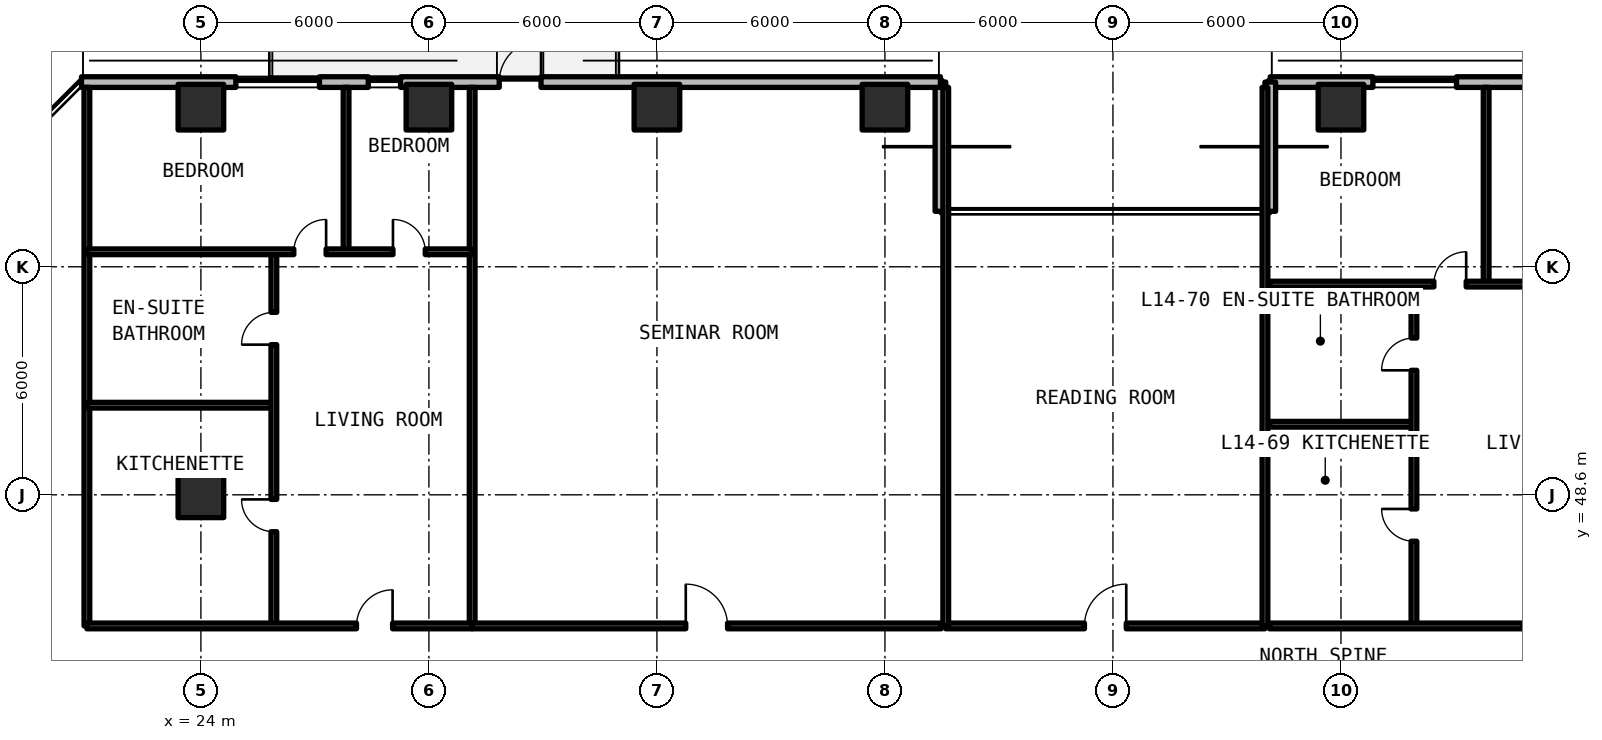
"""IFC4 building model, lengths in metres.
Left out: names, types, materials, properties, quantities, classifications, styles, units other than length and angle.
Written with IfcOpenShell. Run it as: python <this file> out.ifc"""

import sys

from ifc_helpers import new_model, si_unit, direction, frame, frame_2d, origin, origin_2d, place, context, subcontext, project, spatial, rectangle, extrude, element, fill, save


model = new_model("IFC4")
c1 = context("Model", 3, precision=1e-05, world=origin(), true_north=direction((0.0, 1.0)))
c2 = subcontext(c1, "Body", "Model", "MODEL_VIEW")
j1 = project(units=[si_unit("LENGTHUNIT", "METRE"), si_unit("PLANEANGLEUNIT", "RADIAN")], contexts=[c1])
p1 = place(None, origin())
s1 = spatial("IfcSite", under=j1, at=p1, CompositionType="ELEMENT")
p2 = place(p1, origin())
s2 = spatial("IfcBuilding", under=s1, at=p2, CompositionType="ELEMENT")
p3 = place(p2, frame((0.0, 0.0, 52.14)))
s3 = spatial("IfcBuildingStorey", under=s2, at=p3, CompositionType="ELEMENT", Elevation=52.14)
for number, where, z_axis, x_axis in (
    (1, (24.0, 48.6, 0.0), (0.0, 0.0, 1.0), (1.0, 0.0, 0.0)),
    (2, (24.0, 58.8, 0.0), (0.0, 0.0, 1.0), (1.0, 0.0, 0.0)),
    (3, (30.0, 58.8, 0.0), (0.0, 0.0, 1.0), (1.0, 0.0, 0.0)),
    (4, (36.0, 58.8, 0.0), (0.0, 0.0, 1.0), (1.0, 0.0, 0.0)),
    (5, (42.0, 58.8, 0.0), (0.0, 0.0, 1.0), (1.0, 0.0, 0.0)),
    (6, (54.0, 58.8, 0.0), (0.0, 0.0, 1.0), (1.0, 0.0, 0.0)),
):
    element("IfcColumn", number, at=place(p3, frame(where, z_axis=z_axis, x_axis=x_axis)), inside=s3, PredefinedType="COLUMN", context=c2, shape_type="SweptSolid", body=[
        extrude(rectangle(XDim=1.2, YDim=1.2, at=origin_2d()), origin(), (0.0, 0.0, 1.0), 3.3),
    ])
p4 = place(p3, frame((96.542, 59.46, 0.0), z_axis=(0.0, 0.0, 1.0), x_axis=(-1.0, 0.0, 0.0)))
e7 = element("IfcWall", 7, at=p4, inside=s3, PredefinedType="SOLIDWALL", context=c2, shape_type="SweptSolid", body=[
    extrude(rectangle(XDim=44.402, YDim=0.28, at=frame_2d((22.201, 0.0))), origin(), (0.0, 0.0, 1.0), 3.08),
])
p5 = place(p4, frame((32.292, 0.0, 0.0)))
e8 = element("IfcOpeningElement", 8, at=p5, cuts=e7, PredefinedType="OPENING", context=c2, shape_type="SweptSolid", body=[
    extrude(rectangle(XDim=1.1, YDim=2.15, at=frame_2d((0.55, 1.075))), frame((0.0, 0.15, 0.0), z_axis=(0.0, -1.0, 0.0), x_axis=(1.0, 0.0, 0.0)), (0.0, 0.0, 1.0), 0.3),
])
p6 = place(p4, frame((20.692, 0.0, 0.0)))
e9 = element("IfcOpeningElement", 9, at=p6, cuts=e7, PredefinedType="OPENING", context=c2, shape_type="SweptSolid", body=[
    extrude(rectangle(XDim=1.1, YDim=2.15, at=frame_2d((0.55, 1.075))), frame((0.0, 0.15, 0.0), z_axis=(0.0, -1.0, 0.0), x_axis=(1.0, 0.0, 0.0)), (0.0, 0.0, 1.0), 0.3),
])
p7 = place(p4, frame((8.342, 0.0, 0.0)))
e10 = element("IfcOpeningElement", 10, at=p7, cuts=e7, PredefinedType="OPENING", context=c2, shape_type="SweptSolid", body=[
    extrude(rectangle(XDim=1.1, YDim=2.15, at=frame_2d((0.55, 1.075))), frame((0.0, 0.15, 0.0), z_axis=(0.0, -1.0, 0.0), x_axis=(1.0, 0.0, 0.0)), (0.0, 0.0, 1.0), 0.3),
])
p8 = place(p4, frame((39.502, 0.0, 0.78)))
e11 = element("IfcOpeningElement", 11, at=p8, cuts=e7, PredefinedType="OPENING", context=c2, shape_type="SweptSolid", body=[
    extrude(rectangle(XDim=2.2, YDim=1.66, at=frame_2d((1.1, 0.83))), frame((0.0, 0.15, 0.0), z_axis=(0.0, -1.0, 0.0), x_axis=(1.0, 0.0, 0.0)), (0.0, 0.0, 1.0), 0.3),
])
p9 = place(p4, frame((34.821, 0.0, 0.78)))
e12 = element("IfcOpeningElement", 12, at=p9, cuts=e7, PredefinedType="OPENING", context=c2, shape_type="SweptSolid", body=[
    extrude(rectangle(XDim=0.85, YDim=1.65, at=frame_2d((0.425, 0.825))), frame((0.0, 0.15, 0.0), z_axis=(0.0, -1.0, 0.0), x_axis=(1.0, 0.0, 0.0)), (0.0, 0.0, 1.0), 0.3),
])
p10 = place(p4, frame((15.472, 0.0, 0.78)))
e13 = element("IfcOpeningElement", 13, at=p10, cuts=e7, PredefinedType="OPENING", context=c2, shape_type="SweptSolid", body=[
    extrude(rectangle(XDim=2.2, YDim=1.66, at=frame_2d((1.1, 0.83))), frame((0.0, 0.15, 0.0), z_axis=(0.0, -1.0, 0.0), x_axis=(1.0, 0.0, 0.0)), (0.0, 0.0, 1.0), 0.3),
])
p11 = place(p4, frame((2.288, 0.0, 0.78)))
e14 = element("IfcOpeningElement", 14, at=p11, cuts=e7, PredefinedType="OPENING", context=c2, shape_type="SweptSolid", body=[
    extrude(rectangle(XDim=2.2, YDim=1.66, at=frame_2d((1.1, 0.83))), frame((0.0, 0.15, 0.0), z_axis=(0.0, -1.0, 0.0), x_axis=(1.0, 0.0, 0.0)), (0.0, 0.0, 1.0), 0.3),
])
for number, where, z_axis, x_axis in (
    (15, (52.14, 59.46, 0.0), (0.0, 0.0, 1.0), (0.0, -1.0, 0.0)),
    (16, (43.46, 56.06, 0.0), (0.0, 0.0, 1.0), (0.0, 1.0, 0.0)),
):
    element("IfcWall", number, at=place(p3, frame(where, z_axis=z_axis, x_axis=x_axis)), inside=s3, PredefinedType="SOLIDWALL", context=c2, shape_type="SweptSolid", body=[
        extrude(rectangle(XDim=3.4, YDim=0.28, at=frame_2d((1.7, 0.0))), origin(), (0.0, 0.0, 1.0), 3.08),
    ])
p12 = place(p3, frame((43.46, 59.46, 0.0), z_axis=(0.0, 0.0, 1.0), x_axis=(-1.0, 0.0, 0.0)))
e17 = element("IfcWall", 17, at=p12, inside=s3, PredefinedType="SOLIDWALL", context=c2, shape_type="SweptSolid", body=[
    extrude(rectangle(XDim=22.602, YDim=0.28, at=frame_2d((11.301, 0.0))), origin(), (0.0, 0.0, 1.0), 3.08),
])
p13 = place(p12, frame((10.51, 0.0, 0.0)))
e18 = element("IfcOpeningElement", 18, at=p13, cuts=e17, PredefinedType="OPENING", context=c2, shape_type="SweptSolid", body=[
    extrude(rectangle(XDim=1.1, YDim=2.15, at=frame_2d((0.55, 1.075))), frame((0.0, 0.15, 0.0), z_axis=(0.0, -1.0, 0.0), x_axis=(1.0, 0.0, 0.0)), (0.0, 0.0, 1.0), 0.3),
])
p14 = place(p12, frame((16.34, 0.0, 0.78)))
e19 = element("IfcOpeningElement", 19, at=p14, cuts=e17, PredefinedType="OPENING", context=c2, shape_type="SweptSolid", body=[
    extrude(rectangle(XDim=2.2, YDim=1.66, at=frame_2d((1.1, 0.83))), frame((0.0, 0.15, 0.0), z_axis=(0.0, -1.0, 0.0), x_axis=(1.0, 0.0, 0.0)), (0.0, 0.0, 1.0), 0.3),
])
p15 = place(p12, frame((14.206, 0.0, 0.78)))
e20 = element("IfcOpeningElement", 20, at=p15, cuts=e17, PredefinedType="OPENING", context=c2, shape_type="SweptSolid", body=[
    extrude(rectangle(XDim=0.85, YDim=1.65, at=frame_2d((0.425, 0.825))), frame((0.0, 0.15, 0.0), z_axis=(0.0, -1.0, 0.0), x_axis=(1.0, 0.0, 0.0)), (0.0, 0.0, 1.0), 0.3),
])
p16 = place(p3, frame((43.6, 45.15, 0.0), z_axis=(0.0, 0.0, 1.0), x_axis=(1.0, 0.0, 0.0)))
e21 = element("IfcWall", 21, at=p16, inside=s3, PredefinedType="SOLIDWALL", context=c2, shape_type="SweptSolid", body=[
    extrude(rectangle(XDim=8.4, YDim=0.15, at=frame_2d((4.2, 0.0))), origin(), (0.0, 0.0, 1.0), 2.35),
])
p17 = place(p16, frame((3.65, 0.0, 0.0)))
e22 = element("IfcOpeningElement", 22, at=p17, cuts=e21, PredefinedType="OPENING", context=c2, shape_type="SweptSolid", body=[
    extrude(rectangle(XDim=1.1, YDim=2.15, at=frame_2d((0.55, 1.075))), frame((0.0, 0.085, 0.0), z_axis=(0.0, -1.0, 0.0), x_axis=(1.0, 0.0, 0.0)), (0.0, 0.0, 1.0), 0.17),
])
for number, where, z_axis, x_axis in (
    (23, (43.6, 45.15, 0.0), (0.0, 0.0, 1.0), (0.0, 1.0, 0.0)),
    (24, (52.0, 45.15, 0.0), (0.0, 0.0, 1.0), (0.0, 1.0, 0.0)),
    (25, (21.0, 45.15, 0.0), (0.0, 0.0, 1.0), (0.0, 1.0, 0.0)),
    (26, (31.138, 45.15, 0.0), (0.0, 0.0, 1.0), (0.0, 1.0, 0.0)),
):
    element("IfcWall", number, at=place(p3, frame(where, z_axis=z_axis, x_axis=x_axis)), inside=s3, PredefinedType="SOLIDWALL", context=c2, shape_type="SweptSolid", body=[
        extrude(rectangle(XDim=14.17, YDim=0.15, at=frame_2d((7.085, 0.0))), origin(), (0.0, 0.0, 1.0), 2.35),
    ])
p18 = place(p3, frame((21.0, 50.958, 0.0), z_axis=(0.0, 0.0, 1.0), x_axis=(1.0, 0.0, 0.0)))
e27 = element("IfcWall", 27, at=p18, inside=s3, PredefinedType="PARTITIONING", context=c2, shape_type="SweptSolid", body=[
    extrude(rectangle(XDim=4.92, YDim=0.15, at=frame_2d((2.46, 0.0))), origin(), (0.0, 0.0, 1.0), 2.35),
])
p19 = place(p3, frame((25.92, 45.15, 0.0), z_axis=(0.0, 0.0, 1.0), x_axis=(0.0, 1.0, 0.0)))
e28 = element("IfcWall", 28, at=p19, inside=s3, PredefinedType="PARTITIONING", context=c2, shape_type="SweptSolid", body=[
    extrude(rectangle(XDim=9.844, YDim=0.15, at=frame_2d((4.922, 0.0))), origin(), (0.0, 0.0, 1.0), 2.35),
])
p20 = place(p19, frame((2.479, 0.0, 0.0)))
e29 = element("IfcOpeningElement", 29, at=p20, cuts=e28, PredefinedType="OPENING", context=c2, shape_type="SweptSolid", body=[
    extrude(rectangle(XDim=0.85, YDim=2.1, at=frame_2d((0.425, 1.05))), frame((0.0, 0.085, 0.0), z_axis=(0.0, -1.0, 0.0), x_axis=(1.0, 0.0, 0.0)), (0.0, 0.0, 1.0), 0.17),
])
p21 = place(p19, frame((7.401, 0.0, 0.0)))
e30 = element("IfcOpeningElement", 30, at=p21, cuts=e28, PredefinedType="OPENING", context=c2, shape_type="SweptSolid", body=[
    extrude(rectangle(XDim=0.85, YDim=2.1, at=frame_2d((0.425, 1.05))), frame((0.0, 0.085, 0.0), z_axis=(0.0, -1.0, 0.0), x_axis=(1.0, 0.0, 0.0)), (0.0, 0.0, 1.0), 0.17),
])
p22 = place(p3, frame((27.82, 54.994, 0.0), z_axis=(0.0, 0.0, 1.0), x_axis=(0.0, 1.0, 0.0)))
e31 = element("IfcWall", 31, at=p22, inside=s3, PredefinedType="PARTITIONING", context=c2, shape_type="SweptSolid", body=[
    extrude(rectangle(XDim=4.326, YDim=0.15, at=frame_2d((2.163, 0.0))), origin(), (0.0, 0.0, 1.0), 2.35),
])
p23 = place(p3, frame((21.0, 54.994, 0.0), z_axis=(0.0, 0.0, 1.0), x_axis=(1.0, 0.0, 0.0)))
e32 = element("IfcWall", 32, at=p23, inside=s3, PredefinedType="PARTITIONING", context=c2, shape_type="SweptSolid", body=[
    extrude(rectangle(XDim=10.138, YDim=0.15, at=frame_2d((5.069, 0.0))), origin(), (0.0, 0.0, 1.0), 2.35),
])
p24 = place(p23, frame((5.445, 0.0, 0.0)))
e33 = element("IfcOpeningElement", 33, at=p24, cuts=e32, PredefinedType="OPENING", context=c2, shape_type="SweptSolid", body=[
    extrude(rectangle(XDim=0.85, YDim=2.1, at=frame_2d((0.425, 1.05))), frame((0.0, 0.085, 0.0), z_axis=(0.0, -1.0, 0.0), x_axis=(1.0, 0.0, 0.0)), (0.0, 0.0, 1.0), 0.17),
])
p25 = place(p23, frame((8.054, 0.0, 0.0)))
e34 = element("IfcOpeningElement", 34, at=p25, cuts=e32, PredefinedType="OPENING", context=c2, shape_type="SweptSolid", body=[
    extrude(rectangle(XDim=0.85, YDim=2.1, at=frame_2d((0.425, 1.05))), frame((0.0, 0.085, 0.0), z_axis=(0.0, -1.0, 0.0), x_axis=(1.0, 0.0, 0.0)), (0.0, 0.0, 1.0), 0.17),
])
p26 = place(p3, frame((21.0, 45.15, 0.0), z_axis=(0.0, 0.0, 1.0), x_axis=(1.0, 0.0, 0.0)))
e35 = element("IfcWall", 35, at=p26, inside=s3, PredefinedType="SOLIDWALL", context=c2, shape_type="SweptSolid", body=[
    extrude(rectangle(XDim=10.138, YDim=0.15, at=frame_2d((5.069, 0.0))), origin(), (0.0, 0.0, 1.0), 2.35),
])
p27 = place(p26, frame((7.094, 0.0, 0.0)))
e36 = element("IfcOpeningElement", 36, at=p27, cuts=e35, PredefinedType="OPENING", context=c2, shape_type="SweptSolid", body=[
    extrude(rectangle(XDim=0.95, YDim=2.15, at=frame_2d((0.475, 1.075))), frame((0.0, 0.085, 0.0), z_axis=(0.0, -1.0, 0.0), x_axis=(1.0, 0.0, 0.0)), (0.0, 0.0, 1.0), 0.17),
])
p28 = place(p3, frame((31.138, 45.15, 0.0), z_axis=(0.0, 0.0, 1.0), x_axis=(1.0, 0.0, 0.0)))
e37 = element("IfcWall", 37, at=p28, inside=s3, PredefinedType="SOLIDWALL", context=c2, shape_type="SweptSolid", body=[
    extrude(rectangle(XDim=12.342, YDim=0.15, at=frame_2d((6.171, 0.0))), origin(), (0.0, 0.0, 1.0), 2.35),
])
p29 = place(p28, frame((5.621, 0.0, 0.0)))
e38 = element("IfcOpeningElement", 38, at=p29, cuts=e37, PredefinedType="OPENING", context=c2, shape_type="SweptSolid", body=[
    extrude(rectangle(XDim=1.1, YDim=2.15, at=frame_2d((0.55, 1.075))), frame((0.0, 0.085, 0.0), z_axis=(0.0, -1.0, 0.0), x_axis=(1.0, 0.0, 0.0)), (0.0, 0.0, 1.0), 0.17),
])
p30 = place(p3, frame((52.12, 50.457, 0.0), z_axis=(0.0, 0.0, 1.0), x_axis=(1.0, 0.0, 0.0)))
e39 = element("IfcWall", 39, at=p30, inside=s3, PredefinedType="PARTITIONING", context=c2, shape_type="SweptSolid", body=[
    extrude(rectangle(XDim=3.8, YDim=0.15, at=frame_2d((1.9, 0.0))), origin(), (0.0, 0.0, 1.0), 2.35),
])
p31 = place(p3, frame((55.92, 45.15, 0.0), z_axis=(0.0, 0.0, 1.0), x_axis=(0.0, 1.0, 0.0)))
e40 = element("IfcWall", 40, at=p31, inside=s3, PredefinedType="PARTITIONING", context=c2, shape_type="SweptSolid", body=[
    extrude(rectangle(XDim=8.995, YDim=0.15, at=frame_2d((4.497, 0.0))), origin(), (0.0, 0.0, 1.0), 2.35),
])
p32 = place(p31, frame((2.229, 0.0, 0.0)))
e41 = element("IfcOpeningElement", 41, at=p32, cuts=e40, PredefinedType="OPENING", context=c2, shape_type="SweptSolid", body=[
    extrude(rectangle(XDim=0.85, YDim=2.1, at=frame_2d((0.425, 1.05))), frame((0.0, 0.085, 0.0), z_axis=(0.0, -1.0, 0.0), x_axis=(1.0, 0.0, 0.0)), (0.0, 0.0, 1.0), 0.17),
])
p33 = place(p31, frame((6.726, 0.0, 0.0)))
e42 = element("IfcOpeningElement", 42, at=p33, cuts=e40, PredefinedType="OPENING", context=c2, shape_type="SweptSolid", body=[
    extrude(rectangle(XDim=0.85, YDim=2.1, at=frame_2d((0.425, 1.05))), frame((0.0, 0.085, 0.0), z_axis=(0.0, -1.0, 0.0), x_axis=(1.0, 0.0, 0.0)), (0.0, 0.0, 1.0), 0.17),
])
p34 = place(p3, frame((57.82, 54.145, 0.0), z_axis=(0.0, 0.0, 1.0), x_axis=(0.0, 1.0, 0.0)))
e43 = element("IfcWall", 43, at=p34, inside=s3, PredefinedType="PARTITIONING", context=c2, shape_type="SweptSolid", body=[
    extrude(rectangle(XDim=5.176, YDim=0.15, at=frame_2d((2.588, 0.0))), origin(), (0.0, 0.0, 1.0), 2.35),
])
p35 = place(p3, frame((52.12, 54.145, 0.0), z_axis=(0.0, 0.0, 1.0), x_axis=(1.0, 0.0, 0.0)))
e44 = element("IfcWall", 44, at=p35, inside=s3, PredefinedType="PARTITIONING", context=c2, shape_type="SweptSolid", body=[
    extrude(rectangle(XDim=10.432, YDim=0.15, at=frame_2d((5.216, 0.0))), origin(), (0.0, 0.0, 1.0), 2.35),
])
p36 = place(p35, frame((4.325, 0.0, 0.0)))
e45 = element("IfcOpeningElement", 45, at=p36, cuts=e44, PredefinedType="OPENING", context=c2, shape_type="SweptSolid", body=[
    extrude(rectangle(XDim=0.85, YDim=2.1, at=frame_2d((0.425, 1.05))), frame((0.0, 0.085, 0.0), z_axis=(0.0, -1.0, 0.0), x_axis=(1.0, 0.0, 0.0)), (0.0, 0.0, 1.0), 0.17),
])
p37 = place(p35, frame((7.641, 0.0, 0.0)))
e46 = element("IfcOpeningElement", 46, at=p37, cuts=e44, PredefinedType="OPENING", context=c2, shape_type="SweptSolid", body=[
    extrude(rectangle(XDim=0.85, YDim=2.1, at=frame_2d((0.425, 1.05))), frame((0.0, 0.085, 0.0), z_axis=(0.0, -1.0, 0.0), x_axis=(1.0, 0.0, 0.0)), (0.0, 0.0, 1.0), 0.17),
])
p38 = place(p3, frame((52.12, 45.15, 0.0), z_axis=(0.0, 0.0, 1.0), x_axis=(1.0, 0.0, 0.0)))
e47 = element("IfcWall", 47, at=p38, inside=s3, PredefinedType="SOLIDWALL", context=c2, shape_type="SweptSolid", body=[
    extrude(rectangle(XDim=10.432, YDim=0.15, at=frame_2d((5.216, 0.0))), origin(), (0.0, 0.0, 1.0), 2.35),
])
p39 = place(p38, frame((6.681, 0.0, 0.0)))
e48 = element("IfcOpeningElement", 48, at=p39, cuts=e47, PredefinedType="OPENING", context=c2, shape_type="SweptSolid", body=[
    extrude(rectangle(XDim=0.95, YDim=2.15, at=frame_2d((0.475, 1.075))), frame((0.0, 0.085, 0.0), z_axis=(0.0, -1.0, 0.0), x_axis=(1.0, 0.0, 0.0)), (0.0, 0.0, 1.0), 0.17),
])
p40 = place(p8, origin())
e49 = element("IfcWindow", 49, at=p40, inside=s3, PartitioningType="SINGLE_PANEL", PredefinedType="WINDOW", context=c2, shape_type="SweptSolid", body=[
    extrude(rectangle(XDim=2.2, YDim=1.66, at=frame_2d((1.1, 0.83))), frame((0.0, 0.03, 0.0), z_axis=(0.0, -1.0, 0.0), x_axis=(1.0, 0.0, 0.0)), (0.0, 0.0, 1.0), 0.06),
])
fill(e11, e49)
p41 = place(p13, frame((1.1, 0.0, 0.0), z_axis=(0.0, 0.0, 1.0), x_axis=(-1.0, 0.0, 0.0)))
e50 = element("IfcDoor", 50, at=p41, inside=s3, OperationType="SINGLE_SWING_RIGHT", PredefinedType="DOOR", context=c2, shape_type="SweptSolid", body=[
    extrude(rectangle(XDim=1.1, YDim=2.15, at=frame_2d((0.55, 1.075))), frame((0.0, 0.025, 0.0), z_axis=(0.0, -1.0, 0.0), x_axis=(1.0, 0.0, 0.0)), (0.0, 0.0, 1.0), 0.05),
])
fill(e18, e50)
p42 = place(p14, origin())
e51 = element("IfcWindow", 51, at=p42, inside=s3, PartitioningType="SINGLE_PANEL", PredefinedType="WINDOW", context=c2, shape_type="SweptSolid", body=[
    extrude(rectangle(XDim=2.2, YDim=1.66, at=frame_2d((1.1, 0.83))), frame((0.0, 0.03, 0.0), z_axis=(0.0, -1.0, 0.0), x_axis=(1.0, 0.0, 0.0)), (0.0, 0.0, 1.0), 0.06),
])
fill(e19, e51)
p43 = place(p15, origin())
e52 = element("IfcWindow", 52, at=p43, inside=s3, PartitioningType="SINGLE_PANEL", PredefinedType="WINDOW", context=c2, shape_type="SweptSolid", body=[
    extrude(rectangle(XDim=0.85, YDim=1.65, at=frame_2d((0.425, 0.825))), frame((0.0, 0.03, 0.0), z_axis=(0.0, -1.0, 0.0), x_axis=(1.0, 0.0, 0.0)), (0.0, 0.0, 1.0), 0.06),
])
fill(e20, e52)
p44 = place(p17, origin())
e53 = element("IfcDoor", 53, at=p44, inside=s3, OperationType="SINGLE_SWING_RIGHT", PredefinedType="DOOR", context=c2, shape_type="SweptSolid", body=[
    extrude(rectangle(XDim=1.1, YDim=2.15, at=frame_2d((0.55, 1.075))), frame((0.0, 0.025, 0.0), z_axis=(0.0, -1.0, 0.0), x_axis=(1.0, 0.0, 0.0)), (0.0, 0.0, 1.0), 0.05),
])
fill(e22, e53)
p45 = place(p20, origin())
e54 = element("IfcDoor", 54, at=p45, inside=s3, OperationType="SINGLE_SWING_RIGHT", PredefinedType="DOOR", context=c2, shape_type="SweptSolid", body=[
    extrude(rectangle(XDim=0.85, YDim=2.1, at=frame_2d((0.425, 1.05))), frame((0.0, 0.025, 0.0), z_axis=(0.0, -1.0, 0.0), x_axis=(1.0, 0.0, 0.0)), (0.0, 0.0, 1.0), 0.05),
])
fill(e29, e54)
p46 = place(p21, origin())
e55 = element("IfcDoor", 55, at=p46, inside=s3, OperationType="SINGLE_SWING_LEFT", PredefinedType="DOOR", context=c2, shape_type="SweptSolid", body=[
    extrude(rectangle(XDim=0.85, YDim=2.1, at=frame_2d((0.425, 1.05))), frame((0.0, 0.025, 0.0), z_axis=(0.0, -1.0, 0.0), x_axis=(1.0, 0.0, 0.0)), (0.0, 0.0, 1.0), 0.05),
])
fill(e30, e55)
p47 = place(p24, origin())
e56 = element("IfcDoor", 56, at=p47, inside=s3, OperationType="SINGLE_SWING_RIGHT", PredefinedType="DOOR", context=c2, shape_type="SweptSolid", body=[
    extrude(rectangle(XDim=0.85, YDim=2.1, at=frame_2d((0.425, 1.05))), frame((0.0, 0.025, 0.0), z_axis=(0.0, -1.0, 0.0), x_axis=(1.0, 0.0, 0.0)), (0.0, 0.0, 1.0), 0.05),
])
fill(e33, e56)
p48 = place(p25, origin())
e57 = element("IfcDoor", 57, at=p48, inside=s3, OperationType="SINGLE_SWING_LEFT", PredefinedType="DOOR", context=c2, shape_type="SweptSolid", body=[
    extrude(rectangle(XDim=0.85, YDim=2.1, at=frame_2d((0.425, 1.05))), frame((0.0, 0.025, 0.0), z_axis=(0.0, -1.0, 0.0), x_axis=(1.0, 0.0, 0.0)), (0.0, 0.0, 1.0), 0.05),
])
fill(e34, e57)
p49 = place(p27, origin())
e58 = element("IfcDoor", 58, at=p49, inside=s3, OperationType="SINGLE_SWING_RIGHT", PredefinedType="DOOR", context=c2, shape_type="SweptSolid", body=[
    extrude(rectangle(XDim=0.95, YDim=2.15, at=frame_2d((0.475, 1.075))), frame((0.0, 0.025, 0.0), z_axis=(0.0, -1.0, 0.0), x_axis=(1.0, 0.0, 0.0)), (0.0, 0.0, 1.0), 0.05),
])
fill(e36, e58)
p50 = place(p29, origin())
e59 = element("IfcDoor", 59, at=p50, inside=s3, OperationType="SINGLE_SWING_LEFT", PredefinedType="DOOR", context=c2, shape_type="SweptSolid", body=[
    extrude(rectangle(XDim=1.1, YDim=2.15, at=frame_2d((0.55, 1.075))), frame((0.0, 0.025, 0.0), z_axis=(0.0, -1.0, 0.0), x_axis=(1.0, 0.0, 0.0)), (0.0, 0.0, 1.0), 0.05),
])
fill(e38, e59)
p51 = place(p32, origin())
e60 = element("IfcDoor", 60, at=p51, inside=s3, OperationType="SINGLE_SWING_RIGHT", PredefinedType="DOOR", context=c2, shape_type="SweptSolid", body=[
    extrude(rectangle(XDim=0.85, YDim=2.1, at=frame_2d((0.425, 1.05))), frame((0.0, 0.025, 0.0), z_axis=(0.0, -1.0, 0.0), x_axis=(1.0, 0.0, 0.0)), (0.0, 0.0, 1.0), 0.05),
])
fill(e41, e60)
p52 = place(p33, origin())
e61 = element("IfcDoor", 61, at=p52, inside=s3, OperationType="SINGLE_SWING_LEFT", PredefinedType="DOOR", context=c2, shape_type="SweptSolid", body=[
    extrude(rectangle(XDim=0.85, YDim=2.1, at=frame_2d((0.425, 1.05))), frame((0.0, 0.025, 0.0), z_axis=(0.0, -1.0, 0.0), x_axis=(1.0, 0.0, 0.0)), (0.0, 0.0, 1.0), 0.05),
])
fill(e42, e61)
p53 = place(p36, origin())
e62 = element("IfcDoor", 62, at=p53, inside=s3, OperationType="SINGLE_SWING_RIGHT", PredefinedType="DOOR", context=c2, shape_type="SweptSolid", body=[
    extrude(rectangle(XDim=0.85, YDim=2.1, at=frame_2d((0.425, 1.05))), frame((0.0, 0.025, 0.0), z_axis=(0.0, -1.0, 0.0), x_axis=(1.0, 0.0, 0.0)), (0.0, 0.0, 1.0), 0.05),
])
fill(e45, e62)
save(model, sys.argv[1])
